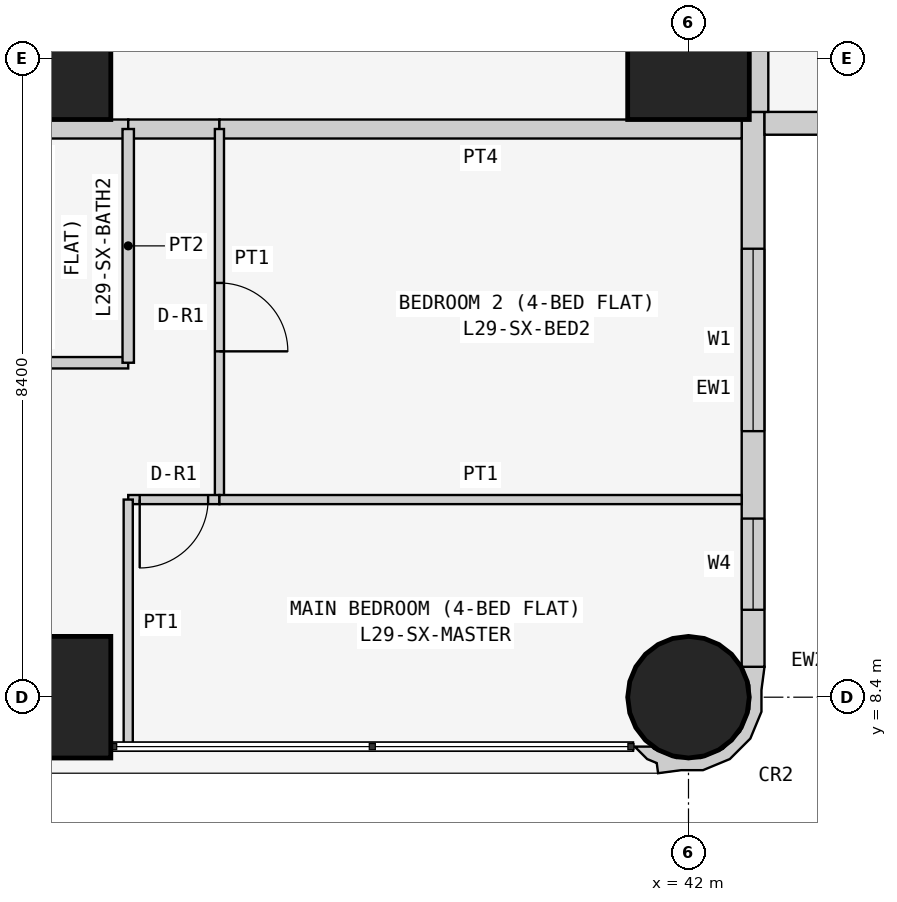
"""IFC4 building model, lengths in metres.
Left out: names, types, materials, properties, quantities, classifications, styles, units other than length and angle.
Written with IfcOpenShell. Run it as: python <this file> out.ifc"""

import sys

from ifc_helpers import new_model, si_unit, direction, frame, frame_2d, origin, origin_2d, place, context, subcontext, project, spatial, polyline, rectangle, circle, outline, extrude, element, fill, save


model = new_model("IFC4")
c1 = context("Model", 3, precision=1e-05, world=origin(), true_north=direction((0.0, 1.0)))
c2 = subcontext(c1, "Body", "Model", "MODEL_VIEW")
j1 = project(units=[si_unit("LENGTHUNIT", "METRE"), si_unit("PLANEANGLEUNIT", "RADIAN")], contexts=[c1])
p1 = place(None, origin())
s1 = spatial("IfcSite", under=j1, at=p1, CompositionType="ELEMENT")
p2 = place(p1, origin())
s2 = spatial("IfcBuilding", under=s1, at=p2, CompositionType="ELEMENT")
p3 = place(p2, frame((0.0, 0.0, 116.1)))
s3 = spatial("IfcBuildingStorey", under=s2, at=p3, CompositionType="ELEMENT", Elevation=116.1)
for number, where, z_axis, x_axis in (
    (1, (33.6, 8.4, 0.0), (0.0, 0.0, 1.0), (1.0, 0.0, 0.0)),
    (2, (33.6, 16.8, 0.0), (0.0, 0.0, 1.0), (1.0, 0.0, 0.0)),
):
    element("IfcColumn", number, at=place(p3, frame(where, z_axis=z_axis, x_axis=x_axis)), inside=s3, PredefinedType="COLUMN", context=c2, shape_type="SweptSolid", body=[
        extrude(rectangle(XDim=1.6, YDim=1.6, at=origin_2d()), origin(), (0.0, 0.0, 1.0), 3.6),
    ])
p4 = place(p3, frame((42.0, 8.4, 0.0), z_axis=(0.0, 0.0, 1.0), x_axis=(1.0, 0.0, 0.0)))
e3 = element("IfcColumn", 3, at=p4, inside=s3, PredefinedType="COLUMN", context=c2, shape_type="SweptSolid", body=[
    extrude(circle(Radius=0.8, at=origin_2d()), origin(), (0.0, 0.0, 1.0), 3.6),
])
p5 = place(p3, frame((42.0, 16.8, 0.0), z_axis=(0.0, 0.0, 1.0), x_axis=(1.0, 0.0, 0.0)))
e4 = element("IfcColumn", 4, at=p5, inside=s3, PredefinedType="COLUMN", context=c2, shape_type="SweptSolid", body=[
    extrude(rectangle(XDim=1.6, YDim=1.6, at=origin_2d()), origin(), (0.0, 0.0, 1.0), 3.6),
])
p6 = place(p3, frame((42.85, 8.8, 0.0), z_axis=(0.0, 0.0, 1.0), x_axis=(0.0, 1.0, 0.0)))
e5 = element("IfcWall", 5, at=p6, inside=s3, PredefinedType="SOLIDWALL", context=c2, shape_type="SweptSolid", body=[
    extrude(rectangle(XDim=7.3, YDim=0.3, at=frame_2d((3.65, 0.0))), origin(), (0.0, 0.0, 1.0), 3.45),
])
p7 = place(p6, frame((3.1, 0.0, 0.9)))
e6 = element("IfcOpeningElement", 6, at=p7, cuts=e5, PredefinedType="OPENING", context=c2, shape_type="SweptSolid", body=[
    extrude(rectangle(XDim=2.4, YDim=1.5, at=frame_2d((1.2, 0.75))), frame((0.0, 0.16, 0.0), z_axis=(0.0, -1.0, 0.0), x_axis=(1.0, 0.0, 0.0)), (0.0, 0.0, 1.0), 0.32),
])
p8 = place(p6, frame((0.75, 0.0, 0.9)))
e7 = element("IfcOpeningElement", 7, at=p8, cuts=e5, PredefinedType="OPENING", context=c2, shape_type="SweptSolid", body=[
    extrude(rectangle(XDim=1.2, YDim=1.5, at=frame_2d((0.6, 0.75))), frame((0.0, 0.16, 0.0), z_axis=(0.0, -1.0, 0.0), x_axis=(1.0, 0.0, 0.0)), (0.0, 0.0, 1.0), 0.32),
])
p9 = place(p3, frame((43.0, 15.95, 0.0), z_axis=(0.0, 0.0, 1.0), x_axis=(1.0, 0.0, 0.0)))
e8 = element("IfcWall", 8, at=p9, inside=s3, PredefinedType="SOLIDWALL", context=c2, shape_type="SweptSolid", body=[
    extrude(rectangle(XDim=15.4, YDim=0.3, at=frame_2d((7.7, 0.0))), origin(), (0.0, 0.0, 1.0), 3.45),
])
p10 = place(p9, frame((1.2, 0.0, 0.9)))
e9 = element("IfcOpeningElement", 9, at=p10, cuts=e8, PredefinedType="OPENING", context=c2, shape_type="SweptSolid", body=[
    extrude(rectangle(XDim=1.8, YDim=1.5, at=frame_2d((0.9, 0.75))), frame((0.0, 0.16, 0.0), z_axis=(0.0, -1.0, 0.0), x_axis=(1.0, 0.0, 0.0)), (0.0, 0.0, 1.0), 0.32),
])
p11 = place(p9, frame((4.95, 0.0, 1.5)))
e10 = element("IfcOpeningElement", 10, at=p11, cuts=e8, PredefinedType="OPENING", context=c2, shape_type="SweptSolid", body=[
    extrude(rectangle(XDim=0.9, YDim=0.7, at=frame_2d((0.45, 0.35))), frame((0.0, 0.16, 0.0), z_axis=(0.0, -1.0, 0.0), x_axis=(1.0, 0.0, 0.0)), (0.0, 0.0, 1.0), 0.32),
])
p12 = place(p9, frame((8.5, 0.0, 0.9)))
e11 = element("IfcOpeningElement", 11, at=p12, cuts=e8, PredefinedType="OPENING", context=c2, shape_type="SweptSolid", body=[
    extrude(rectangle(XDim=1.8, YDim=1.5, at=frame_2d((0.9, 0.75))), frame((0.0, 0.16, 0.0), z_axis=(0.0, -1.0, 0.0), x_axis=(1.0, 0.0, 0.0)), (0.0, 0.0, 1.0), 0.32),
])
p13 = place(p9, frame((12.5, 0.0, 0.0)))
e12 = element("IfcOpeningElement", 12, at=p13, cuts=e8, PredefinedType="OPENING", context=c2, shape_type="SweptSolid", body=[
    extrude(rectangle(XDim=0.9, YDim=2.4, at=frame_2d((0.45, 1.2))), frame((0.0, 0.16, 0.0), z_axis=(0.0, -1.0, 0.0), x_axis=(1.0, 0.0, 0.0)), (0.0, 0.0, 1.0), 0.32),
])
p14 = place(p9, frame((13.5, 0.0, 0.9)))
e13 = element("IfcOpeningElement", 13, at=p14, cuts=e8, PredefinedType="OPENING", context=c2, shape_type="SweptSolid", body=[
    extrude(rectangle(XDim=1.2, YDim=1.5, at=frame_2d((0.6, 0.75))), frame((0.0, 0.16, 0.0), z_axis=(0.0, -1.0, 0.0), x_axis=(1.0, 0.0, 0.0)), (0.0, 0.0, 1.0), 0.32),
])
p15 = place(p3, frame((41.352, 7.805, 0.0), z_axis=(0.0, 0.0, 1.0), x_axis=(0.343276641956, -0.93923434088, 0.0)))
e14 = element("IfcWall", 14, at=p15, inside=s3, PredefinedType="SOLIDWALL", context=c2, shape_type="SweptSolid", body=[
    extrude(outline(polyline([(-0.369, 1.89), (-0.509, 1.621), (-0.49, 1.615), (-0.479, 1.609), (-0.211, 1.62), (0.088, 1.511), (0.323, 1.295), (0.457, 1.006), (0.47, 0.688), (0.361, 0.389), (0.145, 0.154), (0.108, 0.136), (0.031, -0.075), (0.241, 0.023), (0.333, 0.124), (0.465, 0.094), (0.532, 0.393), (0.631, 0.663), (0.614, 1.044), (0.453, 1.391), (0.172, 1.649), (-0.097, 1.748), (-0.369, 1.89)])), origin(), (0.0, 0.0, 1.0), 3.45),
])
p16 = place(p3, frame((42.925, 22.971, 0.0), z_axis=(0.0, 0.0, 1.0), x_axis=(0.0, -1.0, 0.0)))
e15 = element("IfcWall", 15, at=p16, inside=s3, PredefinedType="PARTITIONING", context=c2, shape_type="SweptSolid", body=[
    extrude(rectangle(XDim=6.871, YDim=0.25, at=frame_2d((3.436, 0.0))), origin(), (0.0, 0.0, 1.0), 3.45),
])
p17 = place(p3, frame((34.629, 15.875, 0.0), z_axis=(0.0, 0.0, 1.0), x_axis=(-1.0, 0.0, 0.0)))
e16 = element("IfcWall", 16, at=p17, inside=s3, PredefinedType="PARTITIONING", context=c2, shape_type="SweptSolid", body=[
    extrude(rectangle(XDim=2.629, YDim=0.25, at=frame_2d((1.314, 0.0))), origin(), (0.0, 0.0, 1.0), 3.45),
])
p18 = place(p3, frame((35.829, 15.875, 0.0), z_axis=(0.0, 0.0, 1.0), x_axis=(-1.0, 0.0, 0.0)))
e17 = element("IfcWall", 17, at=p18, inside=s3, PredefinedType="PARTITIONING", context=c2, shape_type="SweptSolid", body=[
    extrude(rectangle(XDim=1.2, YDim=0.25, at=frame_2d((0.6, 0.0))), origin(), (0.0, 0.0, 1.0), 3.45),
])
p19 = place(p3, frame((42.7, 15.875, 0.0), z_axis=(0.0, 0.0, 1.0), x_axis=(-1.0, 0.0, 0.0)))
e18 = element("IfcWall", 18, at=p19, inside=s3, PredefinedType="PARTITIONING", context=c2, shape_type="SweptSolid", body=[
    extrude(rectangle(XDim=6.871, YDim=0.25, at=frame_2d((3.436, 0.0))), origin(), (0.0, 0.0, 1.0), 3.45),
])
p20 = place(p3, frame((32.0, 12.8, 0.0), z_axis=(0.0, 0.0, 1.0), x_axis=(1.0, 0.0, 0.0)))
e19 = element("IfcWall", 19, at=p20, inside=s3, PredefinedType="PARTITIONING", context=c2, shape_type="SweptSolid", body=[
    extrude(rectangle(XDim=2.629, YDim=0.15, at=frame_2d((1.314, 0.0))), origin(), (0.0, 0.0, 1.0), 3.45),
])
p21 = place(p3, frame((34.629, 12.8, 0.0), z_axis=(0.0, 0.0, 1.0), x_axis=(0.0, 1.0, 0.0)))
e20 = element("IfcWall", 20, at=p21, inside=s3, PredefinedType="PARTITIONING", context=c2, shape_type="SweptSolid", body=[
    extrude(rectangle(XDim=3.075, YDim=0.15, at=frame_2d((1.538, 0.0))), origin(), (0.0, 0.0, 1.0), 3.45),
])
p22 = place(p3, frame((35.829, 15.875, 0.0), z_axis=(0.0, 0.0, 1.0), x_axis=(0.0, -1.0, 0.0)))
e21 = element("IfcWall", 21, at=p22, inside=s3, PredefinedType="PARTITIONING", context=c2, shape_type="SweptSolid", body=[
    extrude(rectangle(XDim=4.875, YDim=0.12, at=frame_2d((2.438, 0.0))), origin(), (0.0, 0.0, 1.0), 3.45),
])
p23 = place(p22, frame((2.025, 0.0, 0.0)))
e22 = element("IfcOpeningElement", 22, at=p23, cuts=e21, PredefinedType="OPENING", context=c2, shape_type="SweptSolid", body=[
    extrude(rectangle(XDim=0.9, YDim=2.1, at=frame_2d((0.45, 1.05))), frame((0.0, 0.07, 0.0), z_axis=(0.0, -1.0, 0.0), x_axis=(1.0, 0.0, 0.0)), (0.0, 0.0, 1.0), 0.14),
])
p24 = place(p3, frame((35.829, 11.0, 0.0), z_axis=(0.0, 0.0, 1.0), x_axis=(-1.0, 0.0, 0.0)))
e23 = element("IfcWall", 23, at=p24, inside=s3, PredefinedType="PARTITIONING", context=c2, shape_type="SweptSolid", body=[
    extrude(rectangle(XDim=1.2, YDim=0.12, at=frame_2d((0.6, 0.0))), origin(), (0.0, 0.0, 1.0), 3.45),
])
p25 = place(p24, frame((0.149, 0.0, 0.0)))
e24 = element("IfcOpeningElement", 24, at=p25, cuts=e23, PredefinedType="OPENING", context=c2, shape_type="SweptSolid", body=[
    extrude(rectangle(XDim=0.9, YDim=2.1, at=frame_2d((0.45, 1.05))), frame((0.0, 0.07, 0.0), z_axis=(0.0, -1.0, 0.0), x_axis=(1.0, 0.0, 0.0)), (0.0, 0.0, 1.0), 0.14),
])
p26 = place(p3, frame((34.629, 11.0, 0.0), z_axis=(0.0, 0.0, 1.0), x_axis=(0.0, -1.0, 0.0)))
e25 = element("IfcWall", 25, at=p26, inside=s3, PredefinedType="PARTITIONING", context=c2, shape_type="SweptSolid", body=[
    extrude(rectangle(XDim=3.25, YDim=0.12, at=frame_2d((1.625, 0.0))), origin(), (0.0, 0.0, 1.0), 3.45),
])
p27 = place(p3, frame((35.829, 11.0, 0.0), z_axis=(0.0, 0.0, 1.0), x_axis=(1.0, 0.0, 0.0)))
e26 = element("IfcWall", 26, at=p27, inside=s3, PredefinedType="PARTITIONING", context=c2, shape_type="SweptSolid", body=[
    extrude(rectangle(XDim=6.871, YDim=0.12, at=frame_2d((3.436, 0.0))), origin(), (0.0, 0.0, 1.0), 3.45),
])
p28 = place(p7, origin())
e27 = element("IfcWindow", 27, at=p28, inside=s3, PartitioningType="SINGLE_PANEL", PredefinedType="WINDOW", context=c2, shape_type="SweptSolid", body=[
    extrude(rectangle(XDim=2.4, YDim=1.5, at=frame_2d((1.2, 0.75))), frame((0.0, 0.03, 0.0), z_axis=(0.0, -1.0, 0.0), x_axis=(1.0, 0.0, 0.0)), (0.0, 0.0, 1.0), 0.06),
])
fill(e6, e27)
p29 = place(p8, origin())
e28 = element("IfcWindow", 28, at=p29, inside=s3, PartitioningType="SINGLE_PANEL", PredefinedType="WINDOW", context=c2, shape_type="SweptSolid", body=[
    extrude(rectangle(XDim=1.2, YDim=1.5, at=frame_2d((0.6, 0.75))), frame((0.0, 0.03, 0.0), z_axis=(0.0, -1.0, 0.0), x_axis=(1.0, 0.0, 0.0)), (0.0, 0.0, 1.0), 0.06),
])
fill(e7, e28)
p30 = place(p23, origin())
e29 = element("IfcDoor", 29, at=p30, inside=s3, OperationType="SINGLE_SWING_RIGHT", PredefinedType="DOOR", context=c2, shape_type="SweptSolid", body=[
    extrude(rectangle(XDim=0.9, YDim=2.1, at=frame_2d((0.45, 1.05))), frame((0.0, 0.025, 0.0), z_axis=(0.0, -1.0, 0.0), x_axis=(1.0, 0.0, 0.0)), (0.0, 0.0, 1.0), 0.05),
])
fill(e22, e29)
p31 = place(p25, origin())
e30 = element("IfcDoor", 30, at=p31, inside=s3, OperationType="SINGLE_SWING_RIGHT", PredefinedType="DOOR", context=c2, shape_type="SweptSolid", body=[
    extrude(rectangle(XDim=0.9, YDim=2.1, at=frame_2d((0.45, 1.05))), frame((0.0, 0.025, 0.0), z_axis=(0.0, -1.0, 0.0), x_axis=(1.0, 0.0, 0.0)), (0.0, 0.0, 1.0), 0.05),
])
fill(e24, e30)
save(model, sys.argv[1])
